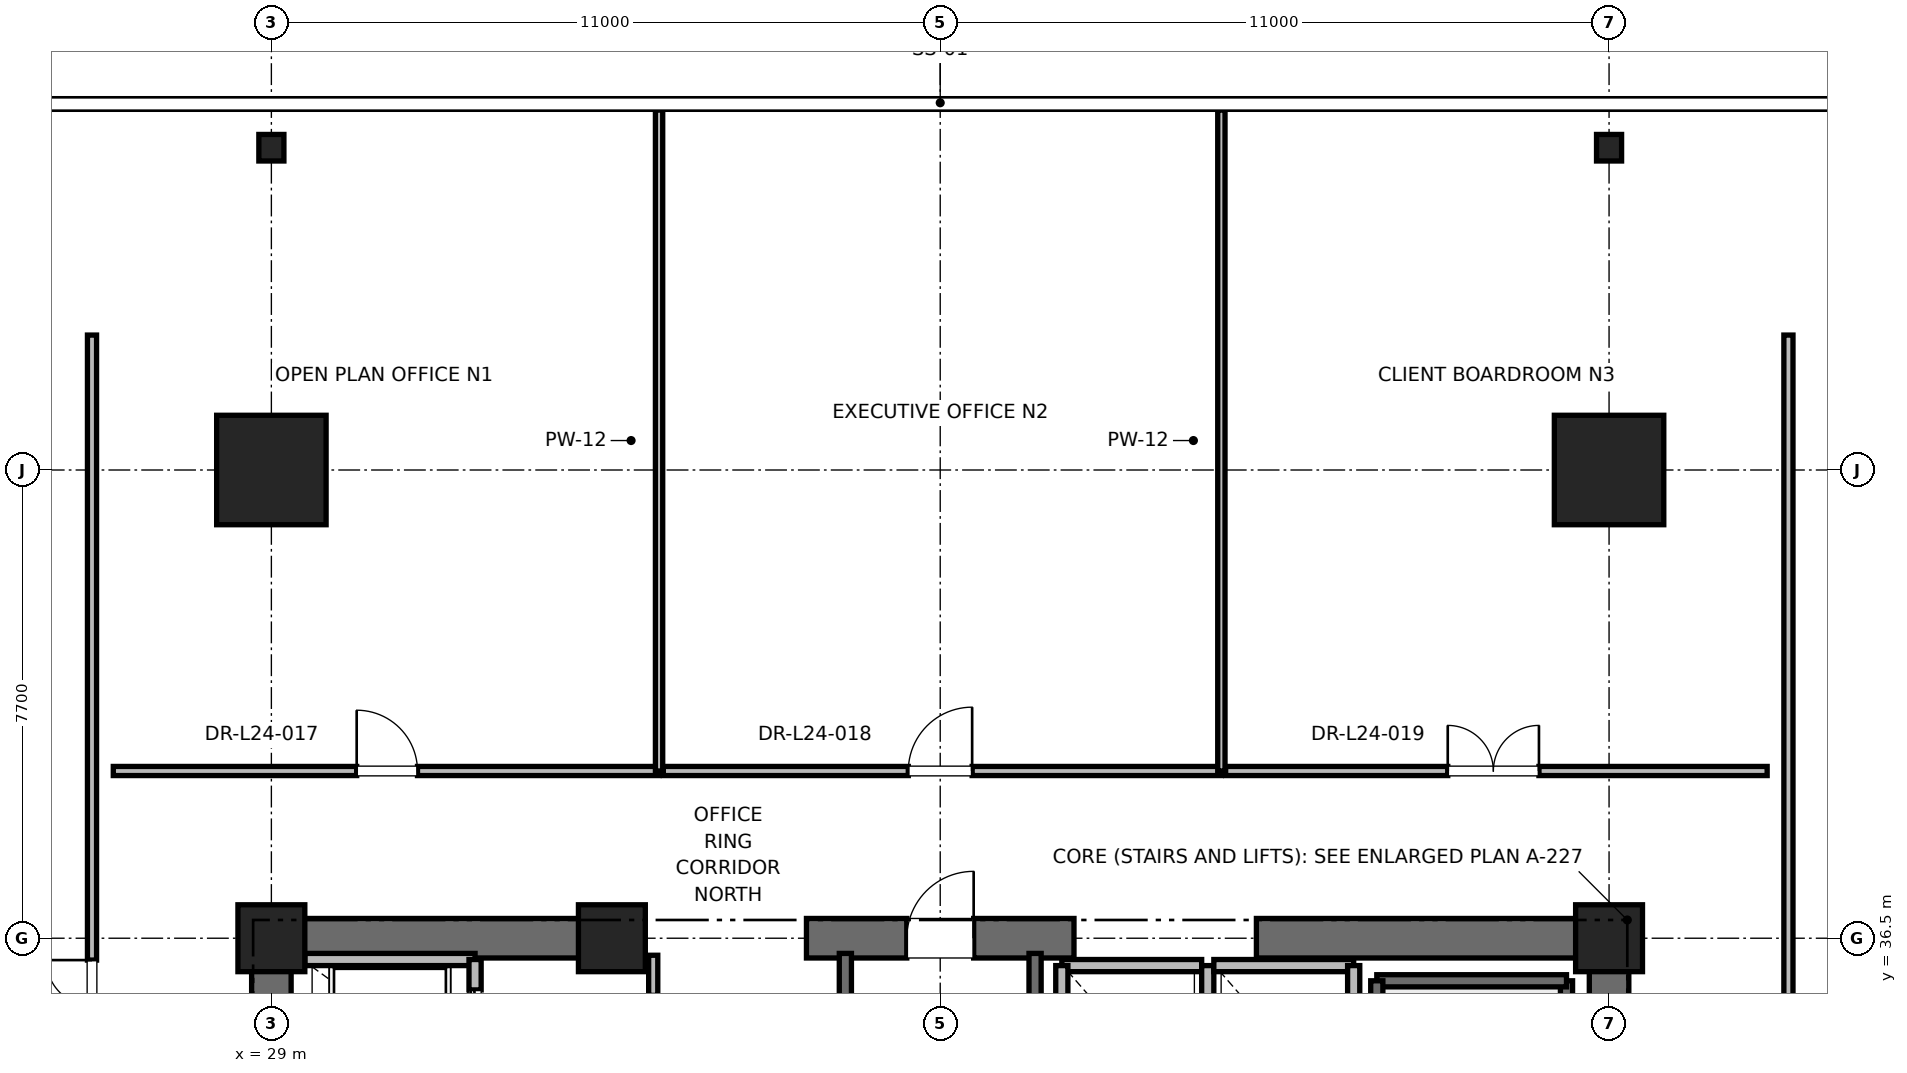
"""IFC4 building model, lengths in metres.
Left out: names, types, materials, properties, quantities, classifications, styles, units other than length and angle.
Written with IfcOpenShell. Run it as: python <this file> out.ifc"""

import sys

from ifc_helpers import new_model, si_unit, direction, frame, frame_2d, origin, origin_2d, place, context, subcontext, project, spatial, rectangle, i_section, extrude, element, fill, save


model = new_model("IFC4")
c1 = context("Model", 3, precision=1e-05, world=origin(), true_north=direction((0.0, 1.0)))
c2 = subcontext(c1, "Body", "Model", "MODEL_VIEW")
j1 = project(units=[si_unit("LENGTHUNIT", "METRE"), si_unit("PLANEANGLEUNIT", "RADIAN")], contexts=[c1])
p1 = place(None, origin())
s1 = spatial("IfcSite", under=j1, at=p1, CompositionType="ELEMENT")
p2 = place(p1, origin())
s2 = spatial("IfcBuilding", under=s1, at=p2, CompositionType="ELEMENT")
p3 = place(p2, frame((0.0, 0.0, 103.6)))
s3 = spatial("IfcBuildingStorey", under=s2, at=p3, CompositionType="ELEMENT", Elevation=103.6)
for number, where, z_axis, x_axis in (
    (1, (29.0, 44.2, 0.0), (0.0, 0.0, 1.0), (1.0, 0.0, 0.0)),
    (2, (51.0, 44.2, 0.0), (0.0, 0.0, 1.0), (1.0, 0.0, 0.0)),
):
    element("IfcColumn", number, at=place(p3, frame(where, z_axis=z_axis, x_axis=x_axis)), inside=s3, PredefinedType="COLUMN", context=c2, shape_type="SweptSolid", body=[
        extrude(rectangle(XDim=1.8, YDim=1.8, at=origin_2d()), origin(), (0.0, 0.0, 1.0), 4.0),
    ])
for number, where, z_axis, x_axis in (
    (3, (29.0, 49.5, 0.0), (0.0, 0.0, 1.0), (1.0, 0.0, 0.0)),
    (4, (51.0, 49.5, 0.0), (0.0, 0.0, 1.0), (1.0, 0.0, 0.0)),
):
    element("IfcColumn", number, at=place(p3, frame(where, z_axis=z_axis, x_axis=x_axis)), inside=s3, PredefinedType="COLUMN", context=c2, shape_type="SweptSolid", body=[
        extrude(i_section(OverallWidth=0.412, OverallDepth=0.437, WebThickness=0.036, FlangeThickness=0.058, FilletRadius=0.015, at=origin_2d()), origin(), (0.0, 0.0, 1.0), 4.0),
    ])
for number, where, z_axis, x_axis in (
    (5, (29.0, 36.5, 0.0), (0.0, 0.0, 1.0), (1.0, 0.0, 0.0)),
    (6, (51.0, 36.5, 0.0), (0.0, 0.0, 1.0), (1.0, 0.0, 0.0)),
    (7, (34.6, 36.5, 0.0), (0.0, 0.0, 1.0), (1.0, 0.0, 0.0)),
):
    element("IfcColumn", number, at=place(p3, frame(where, z_axis=z_axis, x_axis=x_axis)), inside=s3, PredefinedType="PILASTER", context=c2, shape_type="SweptSolid", body=[
        extrude(rectangle(XDim=1.1, YDim=1.1, at=origin_2d()), origin(), (0.0, 0.0, 1.0), 4.0),
    ])
p4 = place(p3, frame((29.0, 36.5, 0.0), z_axis=(0.0, 0.0, 1.0), x_axis=(1.0, 0.0, 0.0)))
e8 = element("IfcWall", 8, at=p4, inside=s3, PredefinedType="SHEAR", context=c2, shape_type="SweptSolid", body=[
    extrude(rectangle(XDim=5.8, YDim=0.65, at=frame_2d((2.9, 0.0))), origin(), (0.0, 0.0, 1.0), 3.7),
])
p5 = place(p3, frame((37.8, 36.5, 0.0), z_axis=(0.0, 0.0, 1.0), x_axis=(1.0, 0.0, 0.0)))
e9 = element("IfcWall", 9, at=p5, inside=s3, PredefinedType="SHEAR", context=c2, shape_type="SweptSolid", body=[
    extrude(rectangle(XDim=4.4, YDim=0.65, at=frame_2d((2.2, 0.0))), origin(), (0.0, 0.0, 1.0), 3.7),
])
p6 = place(p5, frame((1.65, 0.0, 0.0)))
e10 = element("IfcOpeningElement", 10, at=p6, cuts=e9, PredefinedType="OPENING", context=c2, shape_type="SweptSolid", body=[
    extrude(rectangle(XDim=1.1, YDim=2.15, at=frame_2d((0.55, 1.075))), frame((0.0, 0.325, 0.0), z_axis=(0.0, -1.0, 0.0), x_axis=(1.0, 0.0, 0.0)), (0.0, 0.0, 1.0), 0.65),
])
for number, where, z_axis, x_axis in (
    (11, (45.2, 36.5, 0.0), (0.0, 0.0, 1.0), (1.0, 0.0, 0.0)),
    (12, (29.0, 30.7, 0.0), (0.0, 0.0, 1.0), (0.0, 1.0, 0.0)),
):
    element("IfcWall", number, at=place(p3, frame(where, z_axis=z_axis, x_axis=x_axis)), inside=s3, PredefinedType="SHEAR", context=c2, shape_type="SweptSolid", body=[
        extrude(rectangle(XDim=5.8, YDim=0.65, at=frame_2d((2.9, 0.0))), origin(), (0.0, 0.0, 1.0), 3.7),
    ])
p7 = place(p3, frame((51.0, 27.7, 0.0), z_axis=(0.0, 0.0, 1.0), x_axis=(0.0, 1.0, 0.0)))
e13 = element("IfcWall", 13, at=p7, inside=s3, PredefinedType="SHEAR", context=c2, shape_type="SweptSolid", body=[
    extrude(rectangle(XDim=8.8, YDim=0.65, at=frame_2d((4.4, 0.0))), origin(), (0.0, 0.0, 1.0), 3.7),
])
p8 = place(p3, frame((50.3, 27.65, 0.0), z_axis=(0.0, 0.0, 1.0), x_axis=(0.0, 1.0, 0.0)))
e14 = element("IfcWall", 14, at=p8, inside=s3, PredefinedType="SOLIDWALL", context=c2, shape_type="SweptSolid", body=[
    extrude(rectangle(XDim=8.15, YDim=0.2, at=frame_2d((4.075, 0.0))), origin(), (0.0, 0.0, 1.0), 3.7),
])
p9 = place(p3, frame((47.18, 35.8, 0.0), z_axis=(0.0, 0.0, 1.0), x_axis=(1.0, 0.0, 0.0)))
e15 = element("IfcWall", 15, at=p9, inside=s3, PredefinedType="SOLIDWALL", context=c2, shape_type="SweptSolid", body=[
    extrude(rectangle(XDim=3.12, YDim=0.2, at=frame_2d((1.56, 0.0))), origin(), (0.0, 0.0, 1.0), 3.7),
])
p10 = place(p3, frame((47.18, 27.62, 0.0), z_axis=(0.0, 0.0, 1.0), x_axis=(0.0, 1.0, 0.0)))
e16 = element("IfcWall", 16, at=p10, inside=s3, PredefinedType="SOLIDWALL", context=c2, shape_type="SweptSolid", body=[
    extrude(rectangle(XDim=8.18, YDim=0.2, at=frame_2d((4.09, 0.0))), origin(), (0.0, 0.0, 1.0), 3.7),
])
p11 = place(p3, frame((38.44, 27.38, 0.0), z_axis=(0.0, 0.0, 1.0), x_axis=(0.0, 1.0, 0.0)))
e17 = element("IfcWall", 17, at=p11, inside=s3, PredefinedType="SOLIDWALL", context=c2, shape_type="SweptSolid", body=[
    extrude(rectangle(XDim=8.87, YDim=0.2, at=frame_2d((4.435, 0.0))), origin(), (0.0, 0.0, 1.0), 3.7),
])
p12 = place(p3, frame((41.56, 27.68, 0.0), z_axis=(0.0, 0.0, 1.0), x_axis=(0.0, 1.0, 0.0)))
e18 = element("IfcWall", 18, at=p12, inside=s3, PredefinedType="SOLIDWALL", context=c2, shape_type="SweptSolid", body=[
    extrude(rectangle(XDim=8.57, YDim=0.2, at=frame_2d((4.285, 0.0))), origin(), (0.0, 0.0, 1.0), 3.7),
])
p13 = place(p3, frame((32.35, 36.15, 0.0), z_axis=(0.0, 0.0, 1.0), x_axis=(-1.0, 0.0, 0.0)))
e19 = element("IfcWall", 19, at=p13, inside=s3, PredefinedType="SOLIDWALL", context=c2, shape_type="SweptSolid", body=[
    extrude(rectangle(XDim=2.8, YDim=0.2, at=frame_2d((1.4, 0.0))), origin(), (0.0, 0.0, 1.0), 2.753),
])
p14 = place(p3, frame((32.35, 34.05, 0.0), z_axis=(0.0, 0.0, 1.0), x_axis=(0.0, 1.0, 0.0)))
e20 = element("IfcWall", 20, at=p14, inside=s3, PredefinedType="SOLIDWALL", context=c2, shape_type="SweptSolid", body=[
    extrude(rectangle(XDim=2.1, YDim=0.2, at=frame_2d((1.05, 0.0))), origin(), (0.0, 0.0, 1.0), 3.7),
])
p15 = place(p14, frame((0.5, 0.0, 0.0)))
e21 = element("IfcOpeningElement", 21, at=p15, cuts=e20, PredefinedType="OPENING", context=c2, shape_type="SweptSolid", body=[
    extrude(rectangle(XDim=1.1, YDim=2.2, at=frame_2d((0.55, 1.1))), frame((0.0, 0.1, 0.0), z_axis=(0.0, -1.0, 0.0), x_axis=(1.0, 0.0, 0.0)), (0.0, 0.0, 1.0), 0.2),
])
p16 = place(p3, frame((44.3, 36.05, 0.0), z_axis=(0.0, 0.0, 1.0), x_axis=(-1.0, 0.0, 0.0)))
e22 = element("IfcWall", 22, at=p16, inside=s3, PredefinedType="SOLIDWALL", context=c2, shape_type="SweptSolid", body=[
    extrude(rectangle(XDim=2.3, YDim=0.2, at=frame_2d((1.15, 0.0))), origin(), (0.0, 0.0, 1.0), 2.48),
])
for number, where, z_axis, x_axis in (
    (23, (42.0, 36.05, 0.0), (0.0, 0.0, 1.0), (0.0, -1.0, 0.0)),
    (24, (44.4, 33.45, 0.0), (0.0, 0.0, 1.0), (0.0, 1.0, 0.0)),
):
    element("IfcWall", number, at=place(p3, frame(where, z_axis=z_axis, x_axis=x_axis)), inside=s3, PredefinedType="SOLIDWALL", context=c2, shape_type="SweptSolid", body=[
        extrude(rectangle(XDim=2.6, YDim=0.2, at=frame_2d((1.3, 0.0))), origin(), (0.0, 0.0, 1.0), 2.48),
    ])
p17 = place(p3, frame((46.8, 36.05, 0.0), z_axis=(0.0, 0.0, 1.0), x_axis=(-1.0, 0.0, 0.0)))
e25 = element("IfcWall", 25, at=p17, inside=s3, PredefinedType="SOLIDWALL", context=c2, shape_type="SweptSolid", body=[
    extrude(rectangle(XDim=2.3, YDim=0.2, at=frame_2d((1.15, 0.0))), origin(), (0.0, 0.0, 1.0), 2.48),
])
p18 = place(p3, frame((46.8, 33.45, 0.0), z_axis=(0.0, 0.0, 1.0), x_axis=(0.0, 1.0, 0.0)))
e26 = element("IfcWall", 26, at=p18, inside=s3, PredefinedType="SOLIDWALL", context=c2, shape_type="SweptSolid", body=[
    extrude(rectangle(XDim=2.6, YDim=0.2, at=frame_2d((1.3, 0.0))), origin(), (0.0, 0.0, 1.0), 3.7),
])
p19 = place(p3, frame((35.28, 33.95, 0.0), z_axis=(0.0, 0.0, 1.0), x_axis=(0.0, 1.0, 0.0)))
e27 = element("IfcWall", 27, at=p19, inside=s3, PredefinedType="PARTITIONING", context=c2, shape_type="SweptSolid", body=[
    extrude(rectangle(XDim=2.27, YDim=0.15, at=frame_2d((1.135, 0.0))), origin(), (0.0, 0.0, 1.0), 2.48),
])
p20 = place(p19, frame((0.66, 0.0, 0.0)))
e28 = element("IfcOpeningElement", 28, at=p20, cuts=e27, PredefinedType="OPENING", context=c2, shape_type="SweptSolid", body=[
    extrude(rectangle(XDim=0.95, YDim=2.15, at=frame_2d((0.475, 1.075))), frame((0.0, 0.075, 0.0), z_axis=(0.0, -1.0, 0.0), x_axis=(1.0, 0.0, 0.0)), (0.0, 0.0, 1.0), 0.15),
])
p21 = place(p3, frame((26.4, 39.25, 0.0), z_axis=(0.0, 0.0, 1.0), x_axis=(1.0, 0.0, 0.0)))
e29 = element("IfcWall", 29, at=p21, inside=s3, PredefinedType="PARTITIONING", context=c2, shape_type="SweptSolid", body=[
    extrude(rectangle(XDim=8.976, YDim=0.15, at=frame_2d((4.488, 0.0))), origin(), (0.0, 0.0, 1.0), 2.753),
])
p22 = place(p21, frame((4.003, 0.0, 0.0)))
e30 = element("IfcOpeningElement", 30, at=p22, cuts=e29, PredefinedType="OPENING", context=c2, shape_type="SweptSolid", body=[
    extrude(rectangle(XDim=1.0, YDim=2.15, at=frame_2d((0.5, 1.075))), frame((0.0, 0.075, 0.0), z_axis=(0.0, -1.0, 0.0), x_axis=(1.0, 0.0, 0.0)), (0.0, 0.0, 1.0), 0.15),
])
p23 = place(p3, frame((35.376, 39.25, 0.0), z_axis=(0.0, 0.0, 1.0), x_axis=(0.0, 1.0, 0.0)))
e31 = element("IfcWall", 31, at=p23, inside=s3, PredefinedType="PARTITIONING", context=c2, shape_type="SweptSolid", body=[
    extrude(rectangle(XDim=10.869, YDim=0.12, at=frame_2d((5.435, 0.0))), origin(), (0.0, 0.0, 1.0), 2.33),
])
p24 = place(p3, frame((35.446, 39.25, 0.0), z_axis=(0.0, 0.0, 1.0), x_axis=(1.0, 0.0, 0.0)))
e32 = element("IfcWall", 32, at=p24, inside=s3, PredefinedType="PARTITIONING", context=c2, shape_type="SweptSolid", body=[
    extrude(rectangle(XDim=9.178, YDim=0.15, at=frame_2d((4.589, 0.0))), origin(), (0.0, 0.0, 1.0), 2.85),
])
p25 = place(p24, frame((4.029, 0.0, 0.0)))
e33 = element("IfcOpeningElement", 33, at=p25, cuts=e32, PredefinedType="OPENING", context=c2, shape_type="SweptSolid", body=[
    extrude(rectangle(XDim=1.05, YDim=2.2, at=frame_2d((0.525, 1.1))), frame((0.0, 0.075, 0.0), z_axis=(0.0, -1.0, 0.0), x_axis=(1.0, 0.0, 0.0)), (0.0, 0.0, 1.0), 0.15),
])
p26 = place(p3, frame((44.624, 39.25, 0.0), z_axis=(0.0, 0.0, 1.0), x_axis=(0.0, 1.0, 0.0)))
e34 = element("IfcWall", 34, at=p26, inside=s3, PredefinedType="PARTITIONING", context=c2, shape_type="SweptSolid", body=[
    extrude(rectangle(XDim=10.869, YDim=0.12, at=frame_2d((5.435, 0.0))), origin(), (0.0, 0.0, 1.0), 2.33),
])
p27 = place(p3, frame((44.694, 39.25, 0.0), z_axis=(0.0, 0.0, 1.0), x_axis=(1.0, 0.0, 0.0)))
e35 = element("IfcWall", 35, at=p27, inside=s3, PredefinedType="PARTITIONING", context=c2, shape_type="SweptSolid", body=[
    extrude(rectangle(XDim=8.906, YDim=0.15, at=frame_2d((4.453, 0.0))), origin(), (0.0, 0.0, 1.0), 2.753),
])
p28 = place(p27, frame((3.653, 0.0, 0.0)))
e36 = element("IfcOpeningElement", 36, at=p28, cuts=e35, PredefinedType="OPENING", context=c2, shape_type="SweptSolid", body=[
    extrude(rectangle(XDim=1.5, YDim=2.25, at=frame_2d((0.75, 1.125))), frame((0.0, 0.075, 0.0), z_axis=(0.0, -1.0, 0.0), x_axis=(1.0, 0.0, 0.0)), (0.0, 0.0, 1.0), 0.15),
])
p29 = place(p3, frame((26.05, 34.381, 0.0), z_axis=(0.0, 0.0, 1.0), x_axis=(0.0, 1.0, 0.0)))
e37 = element("IfcWall", 37, at=p29, inside=s3, PredefinedType="PARTITIONING", context=c2, shape_type="SweptSolid", body=[
    extrude(rectangle(XDim=12.038, YDim=0.15, at=frame_2d((6.019, 0.0))), origin(), (0.0, 0.0, 1.0), 2.753),
])
p30 = place(p29, frame((0.26, 0.0, 0.0)))
e38 = element("IfcOpeningElement", 38, at=p30, cuts=e37, PredefinedType="OPENING", context=c2, shape_type="SweptSolid", body=[
    extrude(rectangle(XDim=1.5, YDim=2.25, at=frame_2d((0.75, 1.125))), frame((0.0, 0.075, 0.0), z_axis=(0.0, -1.0, 0.0), x_axis=(1.0, 0.0, 0.0)), (0.0, 0.0, 1.0), 0.15),
])
p31 = place(p3, frame((53.95, 24.543, 0.0), z_axis=(0.0, 0.0, 1.0), x_axis=(0.0, 1.0, 0.0)))
e39 = element("IfcWall", 39, at=p31, inside=s3, PredefinedType="PARTITIONING", context=c2, shape_type="SweptSolid", body=[
    extrude(rectangle(XDim=21.876, YDim=0.15, at=frame_2d((10.938, 0.0))), origin(), (0.0, 0.0, 1.0), 2.753),
])
p32 = place(p31, frame((5.428, 0.0, 0.0)))
e40 = element("IfcOpeningElement", 40, at=p32, cuts=e39, PredefinedType="OPENING", context=c2, shape_type="SweptSolid", body=[
    extrude(rectangle(XDim=1.0, YDim=2.15, at=frame_2d((0.5, 1.075))), frame((0.0, 0.075, 0.0), z_axis=(0.0, -1.0, 0.0), x_axis=(1.0, 0.0, 0.0)), (0.0, 0.0, 1.0), 0.15),
])
p33 = place(p6, origin())
e41 = element("IfcDoor", 41, at=p33, inside=s3, OperationType="SINGLE_SWING_RIGHT", PredefinedType="DOOR", context=c2, shape_type="SweptSolid", body=[
    extrude(rectangle(XDim=1.1, YDim=2.15, at=frame_2d((0.55, 1.075))), frame((0.0, 0.025, 0.0), z_axis=(0.0, -1.0, 0.0), x_axis=(1.0, 0.0, 0.0)), (0.0, 0.0, 1.0), 0.05),
])
fill(e10, e41)
p34 = place(p15, origin())
e42 = element("IfcDoor", 42, at=p34, inside=s3, OperationType="SLIDING_TO_RIGHT", PredefinedType="DOOR", context=c2, shape_type="SweptSolid", body=[
    extrude(rectangle(XDim=1.1, YDim=2.2, at=frame_2d((0.55, 1.1))), frame((0.0, 0.025, 0.0), z_axis=(0.0, -1.0, 0.0), x_axis=(1.0, 0.0, 0.0)), (0.0, 0.0, 1.0), 0.05),
])
fill(e21, e42)
p35 = place(p22, origin())
e43 = element("IfcDoor", 43, at=p35, inside=s3, OperationType="SINGLE_SWING_LEFT", PredefinedType="DOOR", context=c2, shape_type="SweptSolid", body=[
    extrude(rectangle(XDim=1.0, YDim=2.15, at=frame_2d((0.5, 1.075))), frame((0.0, 0.025, 0.0), z_axis=(0.0, -1.0, 0.0), x_axis=(1.0, 0.0, 0.0)), (0.0, 0.0, 1.0), 0.05),
])
fill(e30, e43)
p36 = place(p25, origin())
e44 = element("IfcDoor", 44, at=p36, inside=s3, OperationType="SINGLE_SWING_RIGHT", PredefinedType="DOOR", context=c2, shape_type="SweptSolid", body=[
    extrude(rectangle(XDim=1.05, YDim=2.2, at=frame_2d((0.525, 1.1))), frame((0.0, 0.025, 0.0), z_axis=(0.0, -1.0, 0.0), x_axis=(1.0, 0.0, 0.0)), (0.0, 0.0, 1.0), 0.05),
])
fill(e33, e44)
p37 = place(p28, origin())
e45 = element("IfcDoor", 45, at=p37, inside=s3, OperationType="DOUBLE_DOOR_SINGLE_SWING", PredefinedType="DOOR", context=c2, shape_type="SweptSolid", body=[
    extrude(rectangle(XDim=1.5, YDim=2.25, at=frame_2d((0.75, 1.125))), frame((0.0, 0.025, 0.0), z_axis=(0.0, -1.0, 0.0), x_axis=(1.0, 0.0, 0.0)), (0.0, 0.0, 1.0), 0.05),
])
fill(e36, e45)
p38 = place(p30, origin())
e46 = element("IfcDoor", 46, at=p38, inside=s3, OperationType="DOUBLE_DOOR_SINGLE_SWING", PredefinedType="DOOR", context=c2, shape_type="SweptSolid", body=[
    extrude(rectangle(XDim=1.5, YDim=2.25, at=frame_2d((0.75, 1.125))), frame((0.0, 0.025, 0.0), z_axis=(0.0, -1.0, 0.0), x_axis=(1.0, 0.0, 0.0)), (0.0, 0.0, 1.0), 0.05),
])
fill(e38, e46)
save(model, sys.argv[1])
